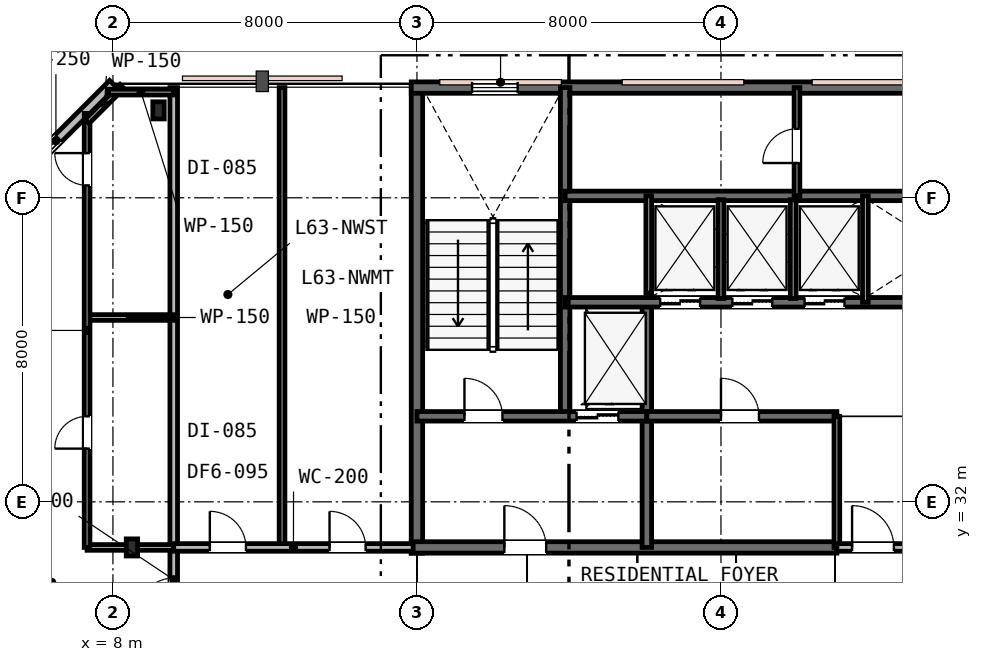
"""IFC4 building model, lengths in metres.
Left out: names, types, materials, properties, quantities, classifications, styles, units other than length and angle.
Written with IfcOpenShell. Run it as: python <this file> out.ifc"""

import sys

from ifc_helpers import new_model, si_unit, direction, frame, frame_2d, origin, origin_2d, place, context, subcontext, project, spatial, rectangle, i_section, extrude, element, fill, save


model = new_model("IFC4")
c1 = context("Model", 3, precision=1e-05, world=origin(), true_north=direction((0.0, 1.0)))
c2 = subcontext(c1, "Body", "Model", "MODEL_VIEW")
j1 = project(units=[si_unit("LENGTHUNIT", "METRE"), si_unit("PLANEANGLEUNIT", "RADIAN")], contexts=[c1])
p1 = place(None, origin())
s1 = spatial("IfcSite", under=j1, at=p1, CompositionType="ELEMENT")
p2 = place(p1, origin())
s2 = spatial("IfcBuilding", under=s1, at=p2, CompositionType="ELEMENT")
p3 = place(p2, frame((0.0, 0.0, 245.0)))
s3 = spatial("IfcBuildingStorey", under=s2, at=p3, CompositionType="ELEMENT", Elevation=245.0)
p4 = place(p3, frame((16.0, 30.65, 0.0), z_axis=(0.0, 0.0, 1.0), x_axis=(0.0, 1.0, 0.0)))
e1 = element("IfcWall", 1, at=p4, inside=s3, PredefinedType="SHEAR", context=c2, shape_type="SweptSolid", body=[
    extrude(rectangle(XDim=12.3, YDim=0.3, at=frame_2d((6.15, 0.0))), origin(), (0.0, 0.0, 1.0), 3.8),
])
p5 = place(p3, frame((15.85, 42.9, 0.0), z_axis=(0.0, 0.0, 1.0), x_axis=(1.0, 0.0, 0.0)))
e2 = element("IfcWall", 2, at=p5, inside=s3, PredefinedType="SHEAR", context=c2, shape_type="SweptSolid", body=[
    extrude(rectangle(XDim=24.3, YDim=0.3, at=frame_2d((12.15, 0.0))), origin(), (0.0, 0.0, 1.0), 3.8),
])
p6 = place(p5, frame((1.6, 0.0, 0.95)))
e3 = element("IfcOpeningElement", 3, at=p6, cuts=e2, PredefinedType="OPENING", context=c2, shape_type="SweptSolid", body=[
    extrude(rectangle(XDim=1.2, YDim=1.6, at=frame_2d((0.6, 0.8))), frame((0.0, 0.16, 0.0), z_axis=(0.0, -1.0, 0.0), x_axis=(1.0, 0.0, 0.0)), (0.0, 0.0, 1.0), 0.32),
])
p7 = place(p5, frame((16.5, 0.0, 0.95)))
e4 = element("IfcOpeningElement", 4, at=p7, cuts=e2, PredefinedType="OPENING", context=c2, shape_type="SweptSolid", body=[
    extrude(rectangle(XDim=1.2, YDim=1.6, at=frame_2d((0.6, 0.8))), frame((0.0, 0.16, 0.0), z_axis=(0.0, -1.0, 0.0), x_axis=(1.0, 0.0, 0.0)), (0.0, 0.0, 1.0), 0.32),
])
p8 = place(p5, frame((21.6, 0.0, 0.95)))
e5 = element("IfcOpeningElement", 5, at=p8, cuts=e2, PredefinedType="OPENING", context=c2, shape_type="SweptSolid", body=[
    extrude(rectangle(XDim=1.2, YDim=1.6, at=frame_2d((0.6, 0.8))), frame((0.0, 0.16, 0.0), z_axis=(0.0, -1.0, 0.0), x_axis=(1.0, 0.0, 0.0)), (0.0, 0.0, 1.0), 0.32),
])
p9 = place(p3, frame((15.85, 30.8, 0.0), z_axis=(0.0, 0.0, 1.0), x_axis=(1.0, 0.0, 0.0)))
e6 = element("IfcWall", 6, at=p9, inside=s3, PredefinedType="SHEAR", context=c2, shape_type="SweptSolid", body=[
    extrude(rectangle(XDim=11.2, YDim=0.3, at=frame_2d((5.6, 0.0))), origin(), (0.0, 0.0, 1.0), 3.8),
])
p10 = place(p9, frame((2.45, 0.0, 0.0)))
e7 = element("IfcOpeningElement", 7, at=p10, cuts=e6, PredefinedType="OPENING", context=c2, shape_type="SweptSolid", body=[
    extrude(rectangle(XDim=1.1, YDim=2.15, at=frame_2d((0.55, 1.075))), frame((0.0, 0.16, 0.0), z_axis=(0.0, -1.0, 0.0), x_axis=(1.0, 0.0, 0.0)), (0.0, 0.0, 1.0), 0.32),
])
p11 = place(p3, frame((19.9, 34.25, 0.0), z_axis=(0.0, 0.0, 1.0), x_axis=(0.0, 1.0, 0.0)))
e8 = element("IfcWall", 8, at=p11, inside=s3, PredefinedType="SHEAR", context=c2, shape_type="SweptSolid", body=[
    extrude(rectangle(XDim=8.65, YDim=0.25, at=frame_2d((4.325, 0.0))), origin(), (0.0, 0.0, 1.0), 3.8),
])
p12 = place(p3, frame((22.05, 30.8, 0.0), z_axis=(0.0, 0.0, 1.0), x_axis=(0.0, 1.0, 0.0)))
e9 = element("IfcWall", 9, at=p12, inside=s3, PredefinedType="SHEAR", context=c2, shape_type="SweptSolid", body=[
    extrude(rectangle(XDim=6.45, YDim=0.25, at=frame_2d((3.225, 0.0))), origin(), (0.0, 0.0, 1.0), 3.8),
])
p13 = place(p3, frame((16.0, 34.25, 0.0), z_axis=(0.0, 0.0, 1.0), x_axis=(1.0, 0.0, 0.0)))
e10 = element("IfcWall", 10, at=p13, inside=s3, PredefinedType="SHEAR", context=c2, shape_type="SweptSolid", body=[
    extrude(rectangle(XDim=6.05, YDim=0.25, at=frame_2d((3.025, 0.0))), origin(), (0.0, 0.0, 1.0), 3.8),
])
p14 = place(p13, frame((1.25, 0.0, 0.0)))
e11 = element("IfcOpeningElement", 11, at=p14, cuts=e10, PredefinedType="OPENING", context=c2, shape_type="SweptSolid", body=[
    extrude(rectangle(XDim=1.0, YDim=2.15, at=frame_2d((0.5, 1.075))), frame((0.0, 0.135, 0.0), z_axis=(0.0, -1.0, 0.0), x_axis=(1.0, 0.0, 0.0)), (0.0, 0.0, 1.0), 0.27),
])
p15 = place(p13, frame((4.2, 0.0, 0.0)))
e12 = element("IfcOpeningElement", 12, at=p15, cuts=e10, PredefinedType="OPENING", context=c2, shape_type="SweptSolid", body=[
    extrude(rectangle(XDim=1.1, YDim=2.15, at=frame_2d((0.55, 1.075))), frame((0.0, 0.135, 0.0), z_axis=(0.0, -1.0, 0.0), x_axis=(1.0, 0.0, 0.0)), (0.0, 0.0, 1.0), 0.27),
])
p16 = place(p3, frame((22.05, 34.25, 0.0), z_axis=(0.0, 0.0, 1.0), x_axis=(1.0, 0.0, 0.0)))
e13 = element("IfcWall", 13, at=p16, inside=s3, PredefinedType="SHEAR", context=c2, shape_type="SweptSolid", body=[
    extrude(rectangle(XDim=5.0, YDim=0.25, at=frame_2d((2.5, 0.0))), origin(), (0.0, 0.0, 1.0), 3.8),
])
p17 = place(p16, frame((1.95, 0.0, 0.0)))
e14 = element("IfcOpeningElement", 14, at=p17, cuts=e13, PredefinedType="OPENING", context=c2, shape_type="SweptSolid", body=[
    extrude(rectangle(XDim=1.0, YDim=2.15, at=frame_2d((0.5, 1.075))), frame((0.0, 0.135, 0.0), z_axis=(0.0, -1.0, 0.0), x_axis=(1.0, 0.0, 0.0)), (0.0, 0.0, 1.0), 0.27),
])
p18 = place(p3, frame((19.9, 37.25, 0.0), z_axis=(0.0, 0.0, 1.0), x_axis=(1.0, 0.0, 0.0)))
e15 = element("IfcWall", 15, at=p18, inside=s3, PredefinedType="SHEAR", context=c2, shape_type="SweptSolid", body=[
    extrude(rectangle(XDim=16.2, YDim=0.25, at=frame_2d((8.1, 0.0))), origin(), (0.0, 0.0, 1.0), 3.8),
])
p19 = place(p18, frame((12.55, 0.0, 0.0)))
e16 = element("IfcOpeningElement", 16, at=p19, cuts=e15, PredefinedType="OPENING", context=c2, shape_type="SweptSolid", body=[
    extrude(rectangle(XDim=0.9, YDim=2.15, at=frame_2d((0.45, 1.075))), frame((0.0, 0.135, 0.0), z_axis=(0.0, -1.0, 0.0), x_axis=(1.0, 0.0, 0.0)), (0.0, 0.0, 1.0), 0.27),
])
p20 = place(p18, frame((2.5, 0.0, 0.0)))
e17 = element("IfcOpeningElement", 17, at=p20, cuts=e15, PredefinedType="OPENING", context=c2, shape_type="SweptSolid", body=[
    extrude(rectangle(XDim=1.05, YDim=2.15, at=frame_2d((0.525, 1.075))), frame((0.0, 0.135, 0.0), z_axis=(0.0, -1.0, 0.0), x_axis=(1.0, 0.0, 0.0)), (0.0, 0.0, 1.0), 0.27),
])
p21 = place(p18, frame((4.4, 0.0, 0.0)))
e18 = element("IfcOpeningElement", 18, at=p21, cuts=e15, PredefinedType="OPENING", context=c2, shape_type="SweptSolid", body=[
    extrude(rectangle(XDim=1.05, YDim=2.15, at=frame_2d((0.525, 1.075))), frame((0.0, 0.135, 0.0), z_axis=(0.0, -1.0, 0.0), x_axis=(1.0, 0.0, 0.0)), (0.0, 0.0, 1.0), 0.27),
])
p22 = place(p18, frame((6.3, 0.0, 0.0)))
e19 = element("IfcOpeningElement", 19, at=p22, cuts=e15, PredefinedType="OPENING", context=c2, shape_type="SweptSolid", body=[
    extrude(rectangle(XDim=1.05, YDim=2.15, at=frame_2d((0.525, 1.075))), frame((0.0, 0.135, 0.0), z_axis=(0.0, -1.0, 0.0), x_axis=(1.0, 0.0, 0.0)), (0.0, 0.0, 1.0), 0.27),
])
p23 = place(p3, frame((19.9, 40.05, 0.0), z_axis=(0.0, 0.0, 1.0), x_axis=(1.0, 0.0, 0.0)))
e20 = element("IfcWall", 20, at=p23, inside=s3, PredefinedType="SHEAR", context=c2, shape_type="SweptSolid", body=[
    extrude(rectangle(XDim=12.05, YDim=0.25, at=frame_2d((6.025, 0.0))), origin(), (0.0, 0.0, 1.0), 3.8),
])
for number, where, z_axis, x_axis in (
    (21, (8.5, 30.8, 0.0), (0.0, 0.0, 1.0), (1.0, 0.0, 0.0)),
    (22, (9.2, 42.3, 0.0), (0.0, 0.0, 1.0), (1.0, 0.0, 0.0)),
):
    element("IfcColumn", number, at=place(p3, frame(where, z_axis=z_axis, x_axis=x_axis)), inside=s3, PredefinedType="COLUMN", context=c2, shape_type="SweptSolid", body=[
        extrude(i_section(OverallWidth=0.3, OverallDepth=0.45, WebThickness=0.014, FlangeThickness=0.026, FilletRadius=0.027, at=origin_2d()), origin(), (0.0, 0.0, 1.0), 3.8),
    ])
p24 = place(p3, frame((8.0, 43.0, 0.0), z_axis=(0.0, 0.0, 1.0), x_axis=(-0.707106781187, -0.707106781187, 0.0)))
e23 = element("IfcWall", 23, at=p24, inside=s3, PredefinedType="STANDARD", context=c2, shape_type="SweptSolid", body=[
    extrude(rectangle(XDim=4.243, YDim=0.25, at=frame_2d((2.121, 0.0))), origin(), (0.0, 0.0, 1.0), 3.53),
])
p25 = place(p24, frame((2.027, 0.0, 0.85)))
e24 = element("IfcOpeningElement", 24, at=p25, cuts=e23, PredefinedType="OPENING", context=c2, shape_type="SweptSolid", body=[
    extrude(rectangle(XDim=1.2, YDim=1.6, at=frame_2d((0.6, 0.8))), frame((0.0, 0.135, 0.0), z_axis=(0.0, -1.0, 0.0), x_axis=(1.0, 0.0, 0.0)), (0.0, 0.0, 1.0), 0.27),
])
p26 = place(p3, frame((27.05, 30.8, 0.0), z_axis=(0.0, 0.0, 1.0), x_axis=(0.0, 1.0, 0.0)))
e25 = element("IfcWall", 25, at=p26, inside=s3, PredefinedType="PLUMBINGWALL", context=c2, shape_type="SweptSolid", body=[
    extrude(rectangle(XDim=3.45, YDim=0.15, at=frame_2d((1.725, 0.0))), origin(), (0.0, 0.0, 1.0), 3.28),
])
p27 = place(p3, frame((27.05, 30.8, 0.0), z_axis=(0.0, 0.0, 1.0), x_axis=(1.0, 0.0, 0.0)))
e26 = element("IfcWall", 26, at=p27, inside=s3, PredefinedType="PARTITIONING", context=c2, shape_type="SweptSolid", body=[
    extrude(rectangle(XDim=1.9, YDim=0.2, at=frame_2d((0.95, 0.0))), origin(), (0.0, 0.0, 1.0), 3.28),
])
p28 = place(p27, frame((0.4, 0.0, 0.0)))
e27 = element("IfcOpeningElement", 27, at=p28, cuts=e26, PredefinedType="OPENING", context=c2, shape_type="SweptSolid", body=[
    extrude(rectangle(XDim=1.1, YDim=2.15, at=frame_2d((0.55, 1.075))), frame((0.0, 0.11, 0.0), z_axis=(0.0, -1.0, 0.0), x_axis=(1.0, 0.0, 0.0)), (0.0, 0.0, 1.0), 0.22),
])
p29 = place(p3, frame((22.1, 37.49, 0.0), z_axis=(0.0, 0.0, 1.0), x_axis=(0.0, 1.0, 0.0)))
e28 = element("IfcWall", 28, at=p29, inside=s3, PredefinedType="PLUMBINGWALL", context=c2, shape_type="SweptSolid", body=[
    extrude(rectangle(XDim=2.56, YDim=0.15, at=frame_2d((1.28, 0.0))), origin(), (0.0, 0.0, 1.0), 3.53),
])
p30 = place(p3, frame((27.8, 37.25, 0.0), z_axis=(0.0, 0.0, 1.0), x_axis=(0.0, 1.0, 0.0)))
e29 = element("IfcWall", 29, at=p30, inside=s3, PredefinedType="PLUMBINGWALL", context=c2, shape_type="SweptSolid", body=[
    extrude(rectangle(XDim=2.8, YDim=0.15, at=frame_2d((1.4, 0.0))), origin(), (0.0, 0.0, 1.0), 3.53),
])
for number, where, z_axis, x_axis in (
    (30, (24.0, 37.35, 0.0), (0.0, 0.0, 1.0), (0.0, 1.0, 0.0)),
    (31, (25.9, 37.35, 0.0), (0.0, 0.0, 1.0), (0.0, 1.0, 0.0)),
):
    element("IfcWall", number, at=place(p3, frame(where, z_axis=z_axis, x_axis=x_axis)), inside=s3, PredefinedType="PLUMBINGWALL", context=c2, shape_type="SweptSolid", body=[
        extrude(rectangle(XDim=2.6, YDim=0.15, at=frame_2d((1.3, 0.0))), origin(), (0.0, 0.0, 1.0), 3.53),
    ])
p31 = place(p3, frame((26.0, 40.05, 0.0), z_axis=(0.0, 0.0, 1.0), x_axis=(0.0, 1.0, 0.0)))
e32 = element("IfcWall", 32, at=p31, inside=s3, PredefinedType="PARTITIONING", context=c2, shape_type="SweptSolid", body=[
    extrude(rectangle(XDim=2.85, YDim=0.15, at=frame_2d((1.425, 0.0))), origin(), (0.0, 0.0, 1.0), 3.53),
])
p32 = place(p31, frame((0.865, 0.0, 0.0)))
e33 = element("IfcOpeningElement", 33, at=p32, cuts=e32, PredefinedType="OPENING", context=c2, shape_type="SweptSolid", body=[
    extrude(rectangle(XDim=0.9, YDim=2.15, at=frame_2d((0.45, 1.075))), frame((0.0, 0.085, 0.0), z_axis=(0.0, -1.0, 0.0), x_axis=(1.0, 0.0, 0.0)), (0.0, 0.0, 1.0), 0.17),
])
p33 = place(p3, frame((9.6, 17.0, 0.0), z_axis=(0.0, 0.0, 1.0), x_axis=(0.0, 1.0, 0.0)))
e34 = element("IfcWall", 34, at=p33, inside=s3, PredefinedType="PARTITIONING", context=c2, shape_type="SweptSolid", body=[
    extrude(rectangle(XDim=25.9, YDim=0.2, at=frame_2d((12.95, 0.0))), origin(), (0.0, 0.0, 1.0), 3.16),
])
p34 = place(p33, frame((12.045, 0.0, 0.0)))
e35 = element("IfcOpeningElement", 35, at=p34, cuts=e34, PredefinedType="OPENING", context=c2, shape_type="SweptSolid", body=[
    extrude(rectangle(XDim=0.95, YDim=2.15, at=frame_2d((0.475, 1.075))), frame((0.0, 0.11, 0.0), z_axis=(0.0, -1.0, 0.0), x_axis=(1.0, 0.0, 0.0)), (0.0, 0.0, 1.0), 0.22),
])
p35 = place(p33, frame((3.125, 0.0, 0.0)))
e36 = element("IfcOpeningElement", 36, at=p35, cuts=e34, PredefinedType="OPENING", context=c2, shape_type="SweptSolid", body=[
    extrude(rectangle(XDim=0.95, YDim=2.15, at=frame_2d((0.475, 1.075))), frame((0.0, 0.11, 0.0), z_axis=(0.0, -1.0, 0.0), x_axis=(1.0, 0.0, 0.0)), (0.0, 0.0, 1.0), 0.22),
])
p36 = place(p3, frame((7.32, 30.8, 0.0), z_axis=(0.0, 0.0, 1.0), x_axis=(1.0, 0.0, 0.0)))
e37 = element("IfcWall", 37, at=p36, inside=s3, PredefinedType="PARTITIONING", context=c2, shape_type="SweptSolid", body=[
    extrude(rectangle(XDim=2.28, YDim=0.15, at=frame_2d((1.14, 0.0))), origin(), (0.0, 0.0, 1.0), 3.16),
])
p37 = place(p3, frame((7.32, 36.85, 0.0), z_axis=(0.0, 0.0, 1.0), x_axis=(1.0, 0.0, 0.0)))
e38 = element("IfcWall", 38, at=p37, inside=s3, PredefinedType="PARTITIONING", context=c2, shape_type="SweptSolid", body=[
    extrude(rectangle(XDim=2.28, YDim=0.15, at=frame_2d((1.14, 0.0))), origin(), (0.0, 0.0, 1.0), 3.53),
])
p38 = place(p3, frame((7.32, 30.8, 0.0), z_axis=(0.0, 0.0, 1.0), x_axis=(0.0, 1.0, 0.0)))
e39 = element("IfcWall", 39, at=p38, inside=s3, PredefinedType="PARTITIONING", context=c2, shape_type="SweptSolid", body=[
    extrude(rectangle(XDim=11.42, YDim=0.15, at=frame_2d((5.71, 0.0))), origin(), (0.0, 0.0, 1.0), 3.16),
])
p39 = place(p38, frame((2.6, 0.0, 0.0)))
e40 = element("IfcOpeningElement", 40, at=p39, cuts=e39, PredefinedType="OPENING", context=c2, shape_type="SweptSolid", body=[
    extrude(rectangle(XDim=0.85, YDim=2.15, at=frame_2d((0.425, 1.075))), frame((0.0, 0.085, 0.0), z_axis=(0.0, -1.0, 0.0), x_axis=(1.0, 0.0, 0.0)), (0.0, 0.0, 1.0), 0.17),
])
p40 = place(p38, frame((9.526, 0.0, 0.0)))
e41 = element("IfcOpeningElement", 41, at=p40, cuts=e39, PredefinedType="OPENING", context=c2, shape_type="SweptSolid", body=[
    extrude(rectangle(XDim=0.85, YDim=2.15, at=frame_2d((0.425, 1.075))), frame((0.0, 0.085, 0.0), z_axis=(0.0, -1.0, 0.0), x_axis=(1.0, 0.0, 0.0)), (0.0, 0.0, 1.0), 0.17),
])
p41 = place(p3, frame((7.32, 42.009, 0.0), z_axis=(0.0, 0.0, 1.0), x_axis=(0.707106781187, 0.707106781187, 0.0)))
e42 = element("IfcWall", 42, at=p41, inside=s3, PredefinedType="PARTITIONING", context=c2, shape_type="SweptSolid", body=[
    extrude(rectangle(XDim=1.302, YDim=0.15, at=frame_2d((0.651, 0.0))), origin(), (0.0, 0.0, 1.0), 3.53),
])
p42 = place(p3, frame((7.88, 42.78, 0.0), z_axis=(0.0, 0.0, 1.0), x_axis=(1.0, 0.0, 0.0)))
e43 = element("IfcWall", 43, at=p42, inside=s3, PredefinedType="PARTITIONING", context=c2, shape_type="SweptSolid", body=[
    extrude(rectangle(XDim=1.72, YDim=0.15, at=frame_2d((0.86, 0.0))), origin(), (0.0, 0.0, 1.0), 3.27),
])
p43 = place(p3, frame((12.45, 30.8, 0.0), z_axis=(0.0, 0.0, 1.0), x_axis=(0.0, 1.0, 0.0)))
e44 = element("IfcWall", 44, at=p43, inside=s3, PredefinedType="PARTITIONING", context=c2, shape_type="SweptSolid", body=[
    extrude(rectangle(XDim=12.1, YDim=0.15, at=frame_2d((6.05, 0.0))), origin(), (0.0, 0.0, 1.0), 3.16),
])
p44 = place(p3, frame((9.6, 30.8, 0.0), z_axis=(0.0, 0.0, 1.0), x_axis=(1.0, 0.0, 0.0)))
e45 = element("IfcWall", 45, at=p44, inside=s3, PredefinedType="PARTITIONING", context=c2, shape_type="SweptSolid", body=[
    extrude(rectangle(XDim=6.3, YDim=0.2, at=frame_2d((3.15, 0.0))), origin(), (0.0, 0.0, 1.0), 3.16),
])
p45 = place(p44, frame((0.95, 0.0, 0.0)))
e46 = element("IfcOpeningElement", 46, at=p45, cuts=e45, PredefinedType="OPENING", context=c2, shape_type="SweptSolid", body=[
    extrude(rectangle(XDim=0.95, YDim=2.15, at=frame_2d((0.475, 1.075))), frame((0.0, 0.11, 0.0), z_axis=(0.0, -1.0, 0.0), x_axis=(1.0, 0.0, 0.0)), (0.0, 0.0, 1.0), 0.22),
])
p46 = place(p44, frame((4.1, 0.0, 0.0)))
e47 = element("IfcOpeningElement", 47, at=p46, cuts=e45, PredefinedType="OPENING", context=c2, shape_type="SweptSolid", body=[
    extrude(rectangle(XDim=0.95, YDim=2.15, at=frame_2d((0.475, 1.075))), frame((0.0, 0.11, 0.0), z_axis=(0.0, -1.0, 0.0), x_axis=(1.0, 0.0, 0.0)), (0.0, 0.0, 1.0), 0.22),
])
p47 = place(p6, origin())
e48 = element("IfcWindow", 48, at=p47, inside=s3, PartitioningType="SINGLE_PANEL", PredefinedType="WINDOW", context=c2, shape_type="SweptSolid", body=[
    extrude(rectangle(XDim=1.2, YDim=1.6, at=frame_2d((0.6, 0.8))), frame((0.0, 0.03, 0.0), z_axis=(0.0, -1.0, 0.0), x_axis=(1.0, 0.0, 0.0)), (0.0, 0.0, 1.0), 0.06),
])
fill(e3, e48)
p48 = place(p25, origin())
e49 = element("IfcWindow", 49, at=p48, inside=s3, PartitioningType="SINGLE_PANEL", PredefinedType="WINDOW", context=c2, shape_type="SweptSolid", body=[
    extrude(rectangle(XDim=1.2, YDim=1.6, at=frame_2d((0.6, 0.8))), frame((0.0, 0.03, 0.0), z_axis=(0.0, -1.0, 0.0), x_axis=(1.0, 0.0, 0.0)), (0.0, 0.0, 1.0), 0.06),
])
fill(e24, e49)
p49 = place(p28, origin())
e50 = element("IfcDoor", 50, at=p49, inside=s3, OperationType="SINGLE_SWING_LEFT", PredefinedType="DOOR", context=c2, shape_type="SweptSolid", body=[
    extrude(rectangle(XDim=1.1, YDim=2.15, at=frame_2d((0.55, 1.075))), frame((0.0, 0.025, 0.0), z_axis=(0.0, -1.0, 0.0), x_axis=(1.0, 0.0, 0.0)), (0.0, 0.0, 1.0), 0.05),
])
fill(e27, e50)
p50 = place(p14, origin())
e51 = element("IfcDoor", 51, at=p50, inside=s3, OperationType="SINGLE_SWING_LEFT", PredefinedType="DOOR", context=c2, shape_type="SweptSolid", body=[
    extrude(rectangle(XDim=1.0, YDim=2.15, at=frame_2d((0.5, 1.075))), frame((0.0, 0.025, 0.0), z_axis=(0.0, -1.0, 0.0), x_axis=(1.0, 0.0, 0.0)), (0.0, 0.0, 1.0), 0.05),
])
fill(e11, e51)
p51 = place(p10, origin())
e52 = element("IfcDoor", 52, at=p51, inside=s3, OperationType="SINGLE_SWING_LEFT", PredefinedType="DOOR", context=c2, shape_type="SweptSolid", body=[
    extrude(rectangle(XDim=1.1, YDim=2.15, at=frame_2d((0.55, 1.075))), frame((0.0, 0.025, 0.0), z_axis=(0.0, -1.0, 0.0), x_axis=(1.0, 0.0, 0.0)), (0.0, 0.0, 1.0), 0.05),
])
fill(e7, e52)
p52 = place(p17, origin())
e53 = element("IfcDoor", 53, at=p52, inside=s3, OperationType="SINGLE_SWING_LEFT", PredefinedType="DOOR", context=c2, shape_type="SweptSolid", body=[
    extrude(rectangle(XDim=1.0, YDim=2.15, at=frame_2d((0.5, 1.075))), frame((0.0, 0.025, 0.0), z_axis=(0.0, -1.0, 0.0), x_axis=(1.0, 0.0, 0.0)), (0.0, 0.0, 1.0), 0.05),
])
fill(e14, e53)
p53 = place(p32, origin())
e54 = element("IfcDoor", 54, at=p53, inside=s3, OperationType="SINGLE_SWING_LEFT", PredefinedType="DOOR", context=c2, shape_type="SweptSolid", body=[
    extrude(rectangle(XDim=0.9, YDim=2.15, at=frame_2d((0.45, 1.075))), frame((0.0, 0.025, 0.0), z_axis=(0.0, -1.0, 0.0), x_axis=(1.0, 0.0, 0.0)), (0.0, 0.0, 1.0), 0.05),
])
fill(e33, e54)
p54 = place(p34, origin())
e55 = element("IfcDoor", 55, at=p54, inside=s3, OperationType="SINGLE_SWING_LEFT", PredefinedType="DOOR", context=c2, shape_type="SweptSolid", body=[
    extrude(rectangle(XDim=0.95, YDim=2.15, at=frame_2d((0.475, 1.075))), frame((0.0, 0.025, 0.0), z_axis=(0.0, -1.0, 0.0), x_axis=(1.0, 0.0, 0.0)), (0.0, 0.0, 1.0), 0.05),
])
fill(e35, e55)
p55 = place(p39, origin())
e56 = element("IfcDoor", 56, at=p55, inside=s3, OperationType="SINGLE_SWING_LEFT", PredefinedType="DOOR", context=c2, shape_type="SweptSolid", body=[
    extrude(rectangle(XDim=0.85, YDim=2.15, at=frame_2d((0.425, 1.075))), frame((0.0, 0.025, 0.0), z_axis=(0.0, -1.0, 0.0), x_axis=(1.0, 0.0, 0.0)), (0.0, 0.0, 1.0), 0.05),
])
fill(e40, e56)
p56 = place(p40, origin())
e57 = element("IfcDoor", 57, at=p56, inside=s3, OperationType="SINGLE_SWING_RIGHT", PredefinedType="DOOR", context=c2, shape_type="SweptSolid", body=[
    extrude(rectangle(XDim=0.85, YDim=2.15, at=frame_2d((0.425, 1.075))), frame((0.0, 0.025, 0.0), z_axis=(0.0, -1.0, 0.0), x_axis=(1.0, 0.0, 0.0)), (0.0, 0.0, 1.0), 0.05),
])
fill(e41, e57)
p57 = place(p45, origin())
e58 = element("IfcDoor", 58, at=p57, inside=s3, OperationType="SINGLE_SWING_LEFT", PredefinedType="DOOR", context=c2, shape_type="SweptSolid", body=[
    extrude(rectangle(XDim=0.95, YDim=2.15, at=frame_2d((0.475, 1.075))), frame((0.0, 0.025, 0.0), z_axis=(0.0, -1.0, 0.0), x_axis=(1.0, 0.0, 0.0)), (0.0, 0.0, 1.0), 0.05),
])
fill(e46, e58)
p58 = place(p46, origin())
e59 = element("IfcDoor", 59, at=p58, inside=s3, OperationType="SINGLE_SWING_LEFT", PredefinedType="DOOR", context=c2, shape_type="SweptSolid", body=[
    extrude(rectangle(XDim=0.95, YDim=2.15, at=frame_2d((0.475, 1.075))), frame((0.0, 0.025, 0.0), z_axis=(0.0, -1.0, 0.0), x_axis=(1.0, 0.0, 0.0)), (0.0, 0.0, 1.0), 0.05),
])
fill(e47, e59)
p59 = place(p15, origin())
e60 = element("IfcDoor", 60, at=p59, inside=s3, OperationType="DOUBLE_DOOR_SLIDING", PredefinedType="DOOR", context=c2, shape_type="SweptSolid", body=[
    extrude(rectangle(XDim=1.1, YDim=2.15, at=frame_2d((0.55, 1.075))), frame((0.0, 0.025, 0.0), z_axis=(0.0, -1.0, 0.0), x_axis=(1.0, 0.0, 0.0)), (0.0, 0.0, 1.0), 0.05),
])
fill(e12, e60)
p60 = place(p20, origin())
e61 = element("IfcDoor", 61, at=p60, inside=s3, OperationType="DOUBLE_DOOR_SLIDING", PredefinedType="DOOR", context=c2, shape_type="SweptSolid", body=[
    extrude(rectangle(XDim=1.05, YDim=2.15, at=frame_2d((0.525, 1.075))), frame((0.0, 0.025, 0.0), z_axis=(0.0, -1.0, 0.0), x_axis=(1.0, 0.0, 0.0)), (0.0, 0.0, 1.0), 0.05),
])
fill(e17, e61)
p61 = place(p21, origin())
e62 = element("IfcDoor", 62, at=p61, inside=s3, OperationType="DOUBLE_DOOR_SLIDING", PredefinedType="DOOR", context=c2, shape_type="SweptSolid", body=[
    extrude(rectangle(XDim=1.05, YDim=2.15, at=frame_2d((0.525, 1.075))), frame((0.0, 0.025, 0.0), z_axis=(0.0, -1.0, 0.0), x_axis=(1.0, 0.0, 0.0)), (0.0, 0.0, 1.0), 0.05),
])
fill(e18, e62)
p62 = place(p22, origin())
e63 = element("IfcDoor", 63, at=p62, inside=s3, OperationType="DOUBLE_DOOR_SLIDING", PredefinedType="DOOR", context=c2, shape_type="SweptSolid", body=[
    extrude(rectangle(XDim=1.05, YDim=2.15, at=frame_2d((0.525, 1.075))), frame((0.0, 0.025, 0.0), z_axis=(0.0, -1.0, 0.0), x_axis=(1.0, 0.0, 0.0)), (0.0, 0.0, 1.0), 0.05),
])
fill(e19, e63)
save(model, sys.argv[1])
